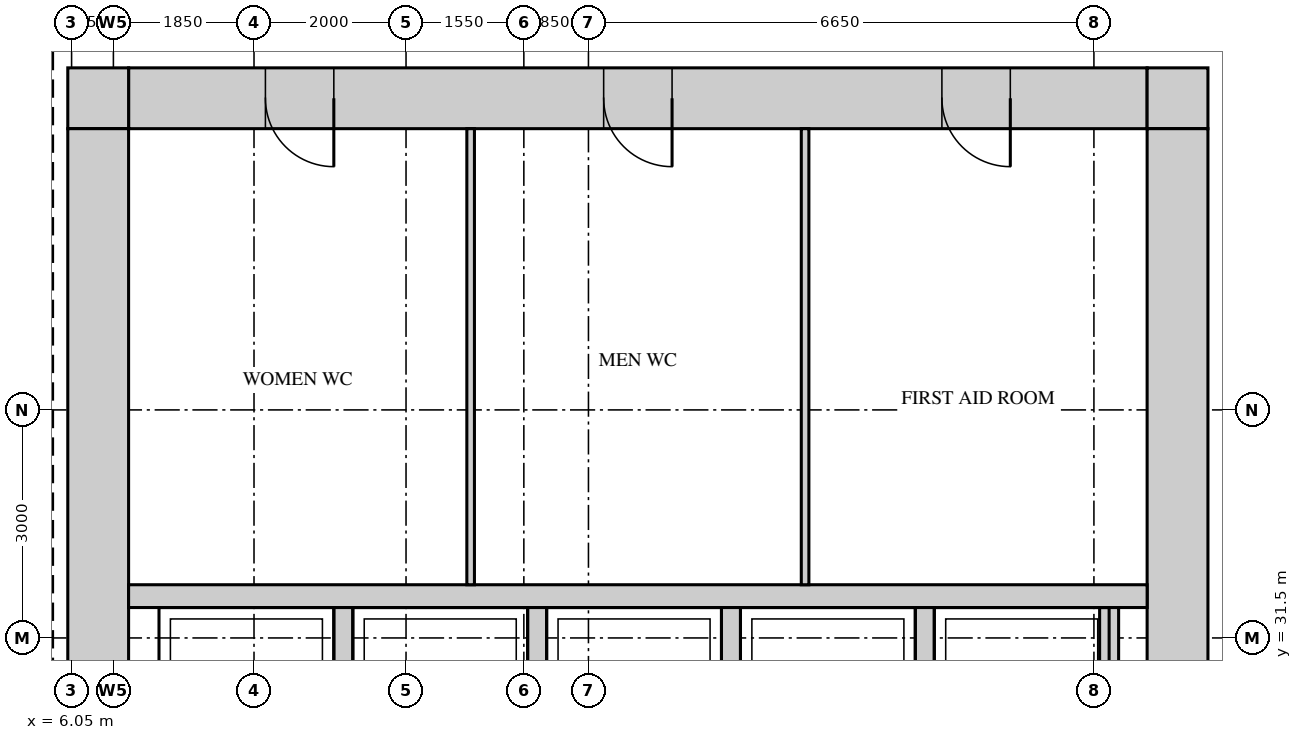
"""IFC4 building model, lengths in metres.
Left out: names, types, materials, properties, quantities, classifications, styles, units other than length and angle.
Written with IfcOpenShell. Run it as: python <this file> out.ifc"""

import sys

from ifc_helpers import new_model, si_unit, direction, frame, frame_2d, origin, place, context, subcontext, project, spatial, rectangle, extrude, source, transform, mapped, element, fill, save


model = new_model("IFC4")
c1 = context("Model", 3, precision=1e-05, world=origin(), true_north=direction((0.0, 1.0)))
c2 = subcontext(c1, "Body", "Model", "MODEL_VIEW")
j1 = project(units=[si_unit("LENGTHUNIT", "METRE"), si_unit("PLANEANGLEUNIT", "RADIAN")], contexts=[c1])
p1 = place(None, origin())
s1 = spatial("IfcSite", under=j1, at=p1, CompositionType="ELEMENT")
p2 = place(p1, origin())
s2 = spatial("IfcBuilding", under=s1, at=p2, CompositionType="ELEMENT")
p3 = place(p2, frame((0.0, 0.0, 204.7)))
s3 = spatial("IfcBuildingStorey", under=s2, at=p3, CompositionType="ELEMENT", Elevation=204.7)
m1 = source(origin(), c2, "Body", "SweptSolid", [
    extrude(rectangle(XDim=13.4, YDim=0.8, at=frame_2d((6.7, 0.0))), origin(), (0.0, 0.0, 1.0), 3.75),
])
p4 = place(p3, frame((6.8, 38.6, 0.0), z_axis=(0.0, 0.0, 1.0), x_axis=(1.0, 0.0, 0.0)))
e1 = element("IfcWall", 1, at=p4, inside=s3, PredefinedType="SHEAR", context=c2, shape_type="MappedRepresentation", body=[
    mapped(m1, transform((0.0, 0.0, 0.0))),
])
m2 = source(origin(), c2, "Body", "SweptSolid", [
    extrude(rectangle(XDim=0.9, YDim=2.1, at=frame_2d((0.45, 1.05))), frame((0.0, 0.41, 0.0), z_axis=(0.0, -1.0, 0.0), x_axis=(1.0, 0.0, 0.0)), (0.0, 0.0, 1.0), 0.82),
])
p5 = place(p4, frame((1.8, 0.0, 0.0)))
e2 = element("IfcOpeningElement", 2, at=p5, cuts=e1, PredefinedType="OPENING", context=c2, shape_type="MappedRepresentation", body=[
    mapped(m2, transform((0.0, 0.0, 0.0))),
])
p6 = place(p4, frame((6.25, 0.0, 0.0)))
e3 = element("IfcOpeningElement", 3, at=p6, cuts=e1, PredefinedType="OPENING", context=c2, shape_type="MappedRepresentation", body=[
    mapped(m2, transform((0.0, 0.0, 0.0))),
])
p7 = place(p4, frame((10.7, 0.0, 0.0)))
e4 = element("IfcOpeningElement", 4, at=p7, cuts=e1, PredefinedType="OPENING", context=c2, shape_type="MappedRepresentation", body=[
    mapped(m2, transform((0.0, 0.0, 0.0))),
])
m3 = source(origin(), c2, "Body", "SweptSolid", [
    extrude(rectangle(XDim=0.8, YDim=0.8, at=frame_2d((0.4, 0.0))), origin(), (0.0, 0.0, 1.0), 3.75),
])
for number, where, z_axis, x_axis in (
    (5, (20.2, 38.6, 0.0), (0.0, 0.0, 1.0), (1.0, 0.0, 0.0)),
    (6, (6.0, 38.6, 0.0), (0.0, 0.0, 1.0), (1.0, 0.0, 0.0)),
):
    element("IfcWall", number, at=place(p3, frame(where, z_axis=z_axis, x_axis=x_axis)), inside=s3, PredefinedType="SHEAR", context=c2, shape_type="MappedRepresentation", body=[
        mapped(m3, transform((0.0, 0.0, 0.0))),
    ])
m4 = source(origin(), c2, "Body", "SweptSolid", [
    extrude(rectangle(XDim=22.4, YDim=0.8, at=frame_2d((11.2, 0.0))), origin(), (0.0, 0.0, 1.0), 3.75),
])
p8 = place(p3, frame((20.6, 15.8, 0.0), z_axis=(0.0, 0.0, 1.0), x_axis=(0.0, 1.0, 0.0)))
e7 = element("IfcWall", 7, at=p8, inside=s3, PredefinedType="SHEAR", context=c2, shape_type="MappedRepresentation", body=[
    mapped(m4, transform((0.0, 0.0, 0.0))),
])
m5 = source(origin(), c2, "Body", "SweptSolid", [
    extrude(rectangle(XDim=1.8, YDim=2.1, at=frame_2d((0.9, 1.05))), frame((0.0, 0.41, 0.0), z_axis=(0.0, -1.0, 0.0), x_axis=(1.0, 0.0, 0.0)), (0.0, 0.0, 1.0), 0.82),
])
p9 = place(p8, frame((10.7, 0.0, 0.0)))
e8 = element("IfcOpeningElement", 8, at=p9, cuts=e7, PredefinedType="OPENING", context=c2, shape_type="MappedRepresentation", body=[
    mapped(m5, transform((0.0, 0.0, 0.0))),
])
p10 = place(p8, frame((0.35, 0.0, 0.0)))
e9 = element("IfcOpeningElement", 9, at=p10, cuts=e7, PredefinedType="OPENING", context=c2, shape_type="MappedRepresentation", body=[
    mapped(m2, transform((0.0, 0.0, 0.0))),
])
p11 = place(p8, frame((2.8, 0.0, 0.0)))
e10 = element("IfcOpeningElement", 10, at=p11, cuts=e7, PredefinedType="OPENING", context=c2, shape_type="MappedRepresentation", body=[
    mapped(m2, transform((0.0, 0.0, 0.0))),
])
m6 = source(origin(), c2, "Body", "SweptSolid", [
    extrude(rectangle(XDim=1.0, YDim=2.1, at=frame_2d((0.5, 1.05))), frame((0.0, 0.41, 0.0), z_axis=(0.0, -1.0, 0.0), x_axis=(1.0, 0.0, 0.0)), (0.0, 0.0, 1.0), 0.82),
])
p12 = place(p8, frame((5.5, 0.0, 0.0)))
e11 = element("IfcOpeningElement", 11, at=p12, cuts=e7, PredefinedType="OPENING", context=c2, shape_type="MappedRepresentation", body=[
    mapped(m6, transform((0.0, 0.0, 0.0))),
])
p13 = place(p3, frame((6.4, 15.8, 0.0), z_axis=(0.0, 0.0, 1.0), x_axis=(0.0, 1.0, 0.0)))
e12 = element("IfcWall", 12, at=p13, inside=s3, PredefinedType="SHEAR", context=c2, shape_type="MappedRepresentation", body=[
    mapped(m4, transform((0.0, 0.0, 0.0))),
])
m7 = source(origin(), c2, "Body", "SweptSolid", [
    extrude(rectangle(XDim=13.4, YDim=0.3, at=frame_2d((6.7, 0.0))), origin(), (0.0, 0.0, 1.0), 3.75),
])
p14 = place(p3, frame((6.8, 32.05, 0.0), z_axis=(0.0, 0.0, 1.0), x_axis=(1.0, 0.0, 0.0)))
e13 = element("IfcWall", 13, at=p14, inside=s3, PredefinedType="STANDARD", context=c2, shape_type="MappedRepresentation", body=[
    mapped(m7, transform((0.0, 0.0, 0.0))),
])
m8 = source(origin(), c2, "Body", "SweptSolid", [
    extrude(rectangle(XDim=2.4, YDim=0.25, at=frame_2d((1.2, 0.0))), origin(), (0.0, 0.0, 1.0), 3.75),
])
for number, where, z_axis, x_axis in (
    (14, (17.275, 29.5, 0.0), (0.0, 0.0, 1.0), (0.0, 1.0, 0.0)),
    (15, (19.7, 29.5, 0.0), (0.0, 0.0, 1.0), (0.0, 1.0, 0.0)),
    (16, (9.625, 29.5, 0.0), (0.0, 0.0, 1.0), (0.0, 1.0, 0.0)),
    (17, (12.175, 29.5, 0.0), (0.0, 0.0, 1.0), (0.0, 1.0, 0.0)),
    (18, (14.725, 29.5, 0.0), (0.0, 0.0, 1.0), (0.0, 1.0, 0.0)),
):
    element("IfcWall", number, at=place(p3, frame(where, z_axis=z_axis, x_axis=x_axis)), inside=s3, PredefinedType="STANDARD", context=c2, shape_type="MappedRepresentation", body=[
        mapped(m8, transform((0.0, 0.0, 0.0))),
    ])
m9 = source(origin(), c2, "Body", "SweptSolid", [
    extrude(rectangle(XDim=6.0, YDim=0.1, at=frame_2d((3.0, 0.0))), origin(), (0.0, 0.0, 1.0), 3.8),
])
for number, where, z_axis, x_axis in (
    (19, (11.3, 32.2, 0.0), (0.0, 0.0, 1.0), (0.0, 1.0, 0.0)),
    (20, (15.7, 32.2, 0.0), (0.0, 0.0, 1.0), (0.0, 1.0, 0.0)),
):
    element("IfcWall", number, at=place(p3, frame(where, z_axis=z_axis, x_axis=x_axis)), inside=s3, PredefinedType="PARTITIONING", context=c2, shape_type="MappedRepresentation", body=[
        mapped(m9, transform((0.0, 0.0, 0.0))),
    ])
m10 = source(origin(), c2, "Body", "SweptSolid", [
    extrude(rectangle(XDim=0.9, YDim=2.1, at=frame_2d((0.45, 1.05))), frame((0.0, 0.35, 0.0), z_axis=(0.0, -1.0, 0.0), x_axis=(1.0, 0.0, 0.0)), (0.0, 0.0, 1.0), 0.7),
])
p15 = place(p5, origin())
e21 = element("IfcDoor", 21, at=p15, inside=s3, OperationType="SINGLE_SWING_RIGHT", PredefinedType="DOOR", context=c2, shape_type="MappedRepresentation", body=[
    mapped(m10, transform((0.0, 0.0, 0.0))),
])
fill(e2, e21)
p16 = place(p6, origin())
e22 = element("IfcDoor", 22, at=p16, inside=s3, OperationType="SINGLE_SWING_RIGHT", PredefinedType="DOOR", context=c2, shape_type="MappedRepresentation", body=[
    mapped(m10, transform((0.0, 0.0, 0.0))),
])
fill(e3, e22)
p17 = place(p7, origin())
e23 = element("IfcDoor", 23, at=p17, inside=s3, OperationType="SINGLE_SWING_RIGHT", PredefinedType="DOOR", context=c2, shape_type="MappedRepresentation", body=[
    mapped(m10, transform((0.0, 0.0, 0.0))),
])
fill(e4, e23)
save(model, sys.argv[1])
